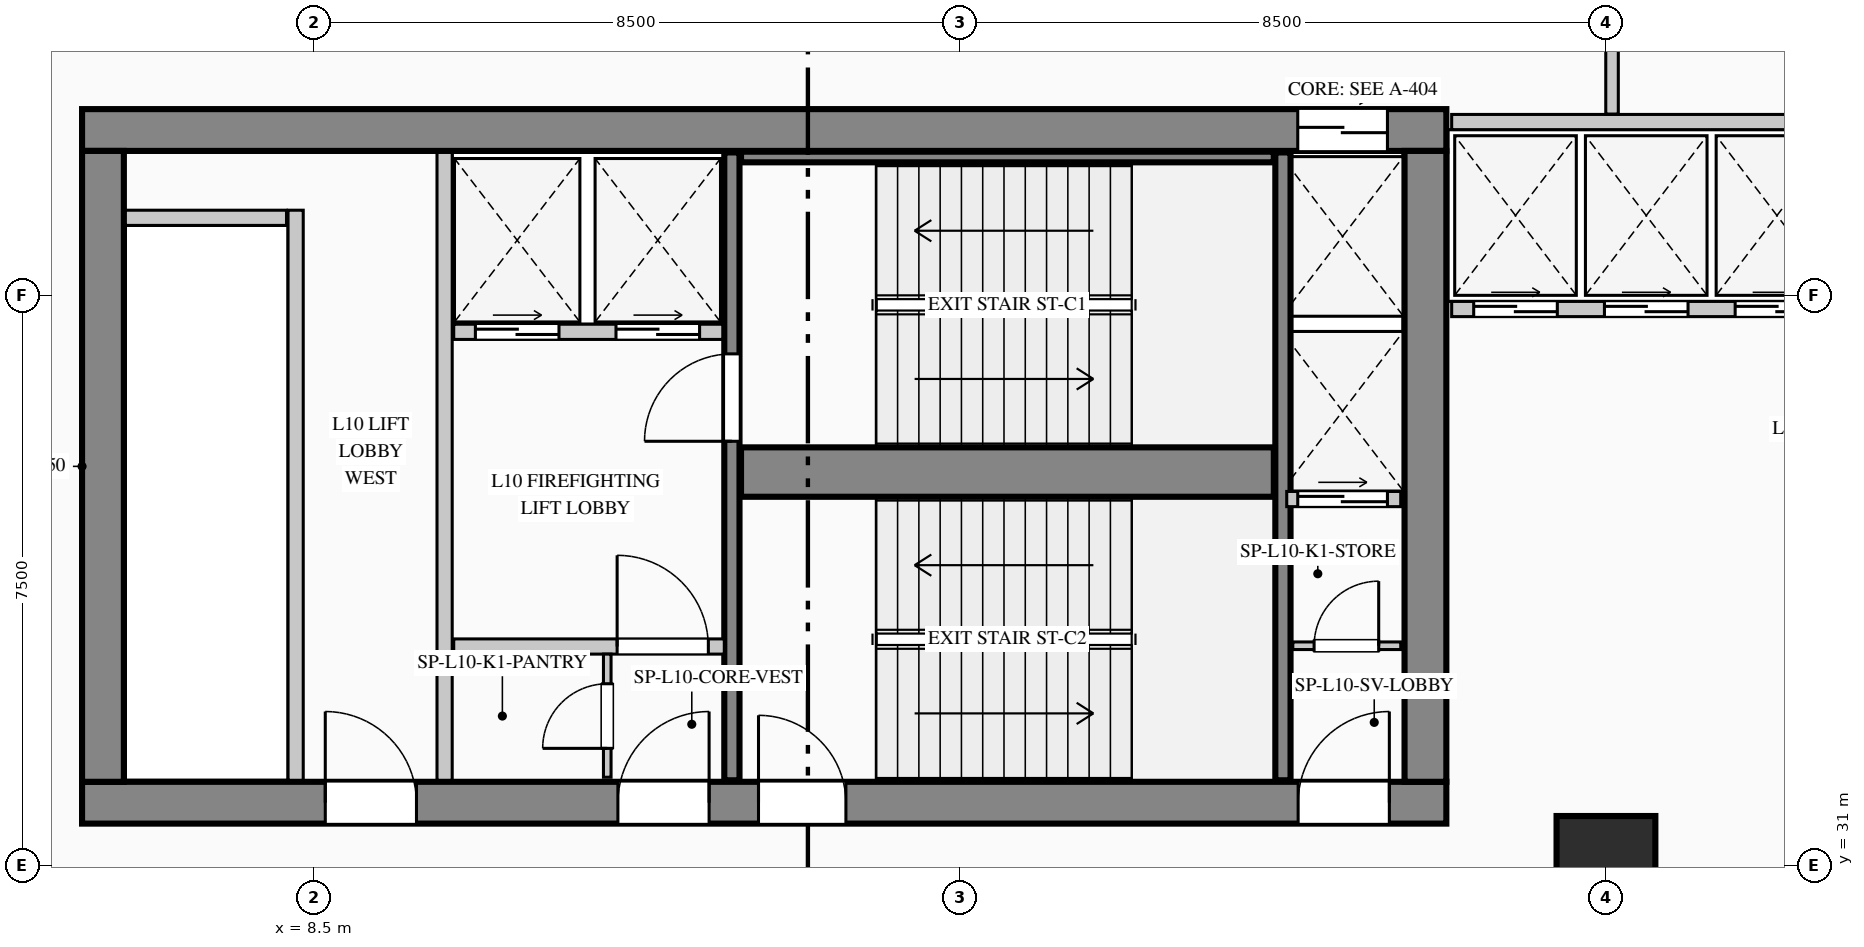
"""IFC4 building model, lengths in metres.
Left out: names, types, materials, properties, quantities, classifications, styles, units other than length and angle.
Written with IfcOpenShell. Run it as: python <this file> out.ifc"""

import sys

from ifc_helpers import new_model, si_unit, direction, frame, frame_2d, origin, origin_2d, place, context, subcontext, project, spatial, rectangle, extrude, element, fill, save


model = new_model("IFC4")
c1 = context("Model", 3, precision=1e-05, world=origin(), true_north=direction((0.0, 1.0)))
c2 = subcontext(c1, "Body", "Model", "MODEL_VIEW")
j1 = project(units=[si_unit("LENGTHUNIT", "METRE"), si_unit("PLANEANGLEUNIT", "RADIAN")], contexts=[c1])
p1 = place(None, origin())
s1 = spatial("IfcSite", under=j1, at=p1, CompositionType="ELEMENT")
p2 = place(p1, origin())
s2 = spatial("IfcBuilding", under=s1, at=p2, CompositionType="ELEMENT")
p3 = place(p2, frame((0.0, 0.0, 44.6)))
s3 = spatial("IfcBuildingStorey", under=s2, at=p3, CompositionType="ELEMENT", Elevation=44.6)
p4 = place(p3, frame((5.45, 40.675, 0.0), z_axis=(0.0, 0.0, 1.0), x_axis=(1.0, 0.0, 0.0)))
e1 = element("IfcWall", 1, at=p4, inside=s3, PredefinedType="SHEAR", context=c2, shape_type="SweptSolid", body=[
    extrude(rectangle(XDim=17.95, YDim=0.55, at=frame_2d((8.975, 0.0))), origin(), (0.0, 0.0, 1.0), 4.4),
])
p5 = place(p4, frame((15.995, 0.0, 0.0)))
e2 = element("IfcOpeningElement", 2, at=p5, cuts=e1, PredefinedType="OPENING", context=c2, shape_type="SweptSolid", body=[
    extrude(rectangle(XDim=1.18, YDim=2.25, at=frame_2d((0.59, 1.125))), frame((0.0, 0.285, 0.0), z_axis=(0.0, -1.0, 0.0), x_axis=(1.0, 0.0, 0.0)), (0.0, 0.0, 1.0), 0.57),
])
p6 = place(p3, frame((5.45, 31.825, 0.0), z_axis=(0.0, 0.0, 1.0), x_axis=(1.0, 0.0, 0.0)))
e3 = element("IfcWall", 3, at=p6, inside=s3, PredefinedType="SHEAR", context=c2, shape_type="SweptSolid", body=[
    extrude(rectangle(XDim=17.95, YDim=0.55, at=frame_2d((8.975, 0.0))), origin(), (0.0, 0.0, 1.0), 4.4),
])
p7 = place(p6, frame((3.2, 0.0, 0.0)))
e4 = element("IfcOpeningElement", 4, at=p7, cuts=e3, PredefinedType="OPENING", context=c2, shape_type="SweptSolid", body=[
    extrude(rectangle(XDim=1.2, YDim=2.2, at=frame_2d((0.6, 1.1))), frame((0.0, 0.285, 0.0), z_axis=(0.0, -1.0, 0.0), x_axis=(1.0, 0.0, 0.0)), (0.0, 0.0, 1.0), 0.57),
])
p8 = place(p6, frame((7.05, 0.0, 0.0)))
e5 = element("IfcOpeningElement", 5, at=p8, cuts=e3, PredefinedType="OPENING", context=c2, shape_type="SweptSolid", body=[
    extrude(rectangle(XDim=1.2, YDim=2.2, at=frame_2d((0.6, 1.1))), frame((0.0, 0.285, 0.0), z_axis=(0.0, -1.0, 0.0), x_axis=(1.0, 0.0, 0.0)), (0.0, 0.0, 1.0), 0.57),
])
p9 = place(p6, frame((8.9, 0.0, 0.0)))
e6 = element("IfcOpeningElement", 6, at=p9, cuts=e3, PredefinedType="OPENING", context=c2, shape_type="SweptSolid", body=[
    extrude(rectangle(XDim=1.15, YDim=2.2, at=frame_2d((0.575, 1.1))), frame((0.0, 0.285, 0.0), z_axis=(0.0, -1.0, 0.0), x_axis=(1.0, 0.0, 0.0)), (0.0, 0.0, 1.0), 0.57),
])
p10 = place(p6, frame((16.0, 0.0, 0.0)))
e7 = element("IfcOpeningElement", 7, at=p10, cuts=e3, PredefinedType="OPENING", context=c2, shape_type="SweptSolid", body=[
    extrude(rectangle(XDim=1.2, YDim=2.2, at=frame_2d((0.6, 1.1))), frame((0.0, 0.285, 0.0), z_axis=(0.0, -1.0, 0.0), x_axis=(1.0, 0.0, 0.0)), (0.0, 0.0, 1.0), 0.57),
])
for number, where, z_axis, x_axis in (
    (8, (5.725, 32.1, 0.0), (0.0, 0.0, 1.0), (0.0, 1.0, 0.0)),
    (9, (23.125, 32.1, 0.0), (0.0, 0.0, 1.0), (0.0, 1.0, 0.0)),
):
    element("IfcWall", number, at=place(p3, frame(where, z_axis=z_axis, x_axis=x_axis)), inside=s3, PredefinedType="SHEAR", context=c2, shape_type="SweptSolid", body=[
        extrude(rectangle(XDim=8.3, YDim=0.55, at=frame_2d((4.15, 0.0))), origin(), (0.0, 0.0, 1.0), 4.4),
    ])
p11 = place(p3, frame((14.0, 32.12, 0.0), z_axis=(0.0, 0.0, 1.0), x_axis=(0.0, 1.0, 0.0)))
e10 = element("IfcWall", 10, at=p11, inside=s3, PredefinedType="SHEAR", context=c2, shape_type="SweptSolid", body=[
    extrude(rectangle(XDim=8.26, YDim=0.2, at=frame_2d((4.13, 0.0))), origin(), (0.0, 0.0, 1.0), 4.4),
])
p12 = place(p11, frame((4.46, 0.0, 0.0)))
e11 = element("IfcOpeningElement", 11, at=p12, cuts=e10, PredefinedType="OPENING", context=c2, shape_type="SweptSolid", body=[
    extrude(rectangle(XDim=1.15, YDim=2.2, at=frame_2d((0.575, 1.1))), frame((0.0, 0.11, 0.0), z_axis=(0.0, -1.0, 0.0), x_axis=(1.0, 0.0, 0.0)), (0.0, 0.0, 1.0), 0.22),
])
p13 = place(p3, frame((14.12, 36.175, 0.0), z_axis=(0.0, 0.0, 1.0), x_axis=(1.0, 0.0, 0.0)))
e12 = element("IfcWall", 12, at=p13, inside=s3, PredefinedType="SHEAR", context=c2, shape_type="SweptSolid", body=[
    extrude(rectangle(XDim=7.01, YDim=0.65, at=frame_2d((3.505, 0.0))), origin(), (0.0, 0.0, 1.0), 4.4),
])
p14 = place(p3, frame((21.25, 32.12, 0.0), z_axis=(0.0, 0.0, 1.0), x_axis=(0.0, 1.0, 0.0)))
e13 = element("IfcWall", 13, at=p14, inside=s3, PredefinedType="SHEAR", context=c2, shape_type="SweptSolid", body=[
    extrude(rectangle(XDim=8.26, YDim=0.2, at=frame_2d((4.13, 0.0))), origin(), (0.0, 0.0, 1.0), 4.4),
])
p15 = place(p3, frame((14.12, 40.32, 0.0), z_axis=(0.0, 0.0, 1.0), x_axis=(1.0, 0.0, 0.0)))
e14 = element("IfcWall", 14, at=p15, inside=s3, PredefinedType="SHEAR", context=c2, shape_type="SweptSolid", body=[
    extrude(rectangle(XDim=7.01, YDim=0.14, at=frame_2d((3.505, 0.0))), origin(), (0.0, 0.0, 1.0), 4.4),
])
p16 = place(p3, frame((25.5, 31.0, 0.0), z_axis=(0.0, 0.0, 1.0), x_axis=(1.0, 0.0, 0.0)))
e15 = element("IfcColumn", 15, at=p16, inside=s3, PredefinedType="COLUMN", context=c2, shape_type="SweptSolid", body=[
    extrude(rectangle(XDim=1.3, YDim=1.3, at=origin_2d()), origin(), (0.0, 0.0, 1.0), 4.4),
])
p17 = place(p3, frame((8.523, 4.84, 0.0), z_axis=(0.0, 0.0, 1.0), x_axis=(-0.150394554312, 0.988626055712, 0.0)))
e16 = element("IfcWall", 16, at=p17, inside=s3, PredefinedType="STANDARD", context=c2, shape_type="SweptSolid", body=[
    extrude(rectangle(XDim=36.738, YDim=0.28, at=frame_2d((18.369, 0.0))), origin(), (0.0, 0.0, 1.0), 4.1),
])
p18 = place(p17, frame((22.762, 0.0, 0.9)))
e17 = element("IfcOpeningElement", 17, at=p18, cuts=e16, PredefinedType="OPENING", context=c2, shape_type="SweptSolid", body=[
    extrude(rectangle(XDim=1.5, YDim=1.8, at=frame_2d((0.75, 0.9))), frame((0.0, 0.15, 0.0), z_axis=(0.0, -1.0, 0.0), x_axis=(1.0, 0.0, 0.0)), (0.0, 0.0, 1.0), 0.3),
])
p19 = place(p3, frame((8.26, 32.12, 0.0), z_axis=(0.0, 0.0, 1.0), x_axis=(0.0, 1.0, 0.0)))
e18 = element("IfcWall", 18, at=p19, inside=s3, PredefinedType="PARTITIONING", context=c2, shape_type="SweptSolid", body=[
    extrude(rectangle(XDim=7.5, YDim=0.2, at=frame_2d((3.75, 0.0))), origin(), (0.0, 0.0, 1.0), 4.1),
])
p20 = place(p3, frame((6.02, 39.52, 0.0), z_axis=(0.0, 0.0, 1.0), x_axis=(1.0, 0.0, 0.0)))
e19 = element("IfcWall", 19, at=p20, inside=s3, PredefinedType="PARTITIONING", context=c2, shape_type="SweptSolid", body=[
    extrude(rectangle(XDim=2.12, YDim=0.2, at=frame_2d((1.06, 0.0))), origin(), (0.0, 0.0, 1.0), 4.1),
])
p21 = place(p3, frame((10.22, 32.12, 0.0), z_axis=(0.0, 0.0, 1.0), x_axis=(0.0, 1.0, 0.0)))
e20 = element("IfcWall", 20, at=p21, inside=s3, PredefinedType="PARTITIONING", context=c2, shape_type="SweptSolid", body=[
    extrude(rectangle(XDim=8.26, YDim=0.2, at=frame_2d((4.13, 0.0))), origin(), (0.0, 0.0, 1.0), 4.1),
])
p22 = place(p3, frame((10.34, 38.02, 0.0), z_axis=(0.0, 0.0, 1.0), x_axis=(1.0, 0.0, 0.0)))
e21 = element("IfcWall", 21, at=p22, inside=s3, PredefinedType="PARTITIONING", context=c2, shape_type="SweptSolid", body=[
    extrude(rectangle(XDim=3.54, YDim=0.2, at=frame_2d((1.77, 0.0))), origin(), (0.0, 0.0, 1.0), 4.1),
])
p23 = place(p22, frame((0.285, 0.0, 0.0)))
e22 = element("IfcOpeningElement", 22, at=p23, cuts=e21, PredefinedType="OPENING", context=c2, shape_type="SweptSolid", body=[
    extrude(rectangle(XDim=1.1, YDim=2.2, at=frame_2d((0.55, 1.1))), frame((0.0, 0.11, 0.0), z_axis=(0.0, -1.0, 0.0), x_axis=(1.0, 0.0, 0.0)), (0.0, 0.0, 1.0), 0.22),
])
p24 = place(p22, frame((2.135, 0.0, 0.0)))
e23 = element("IfcOpeningElement", 23, at=p24, cuts=e21, PredefinedType="OPENING", context=c2, shape_type="SweptSolid", body=[
    extrude(rectangle(XDim=1.1, YDim=2.2, at=frame_2d((0.55, 1.1))), frame((0.0, 0.11, 0.0), z_axis=(0.0, -1.0, 0.0), x_axis=(1.0, 0.0, 0.0)), (0.0, 0.0, 1.0), 0.22),
])
p25 = place(p3, frame((10.34, 33.88, 0.0), z_axis=(0.0, 0.0, 1.0), x_axis=(1.0, 0.0, 0.0)))
e24 = element("IfcWall", 24, at=p25, inside=s3, PredefinedType="PARTITIONING", context=c2, shape_type="SweptSolid", body=[
    extrude(rectangle(XDim=3.56, YDim=0.2, at=frame_2d((1.78, 0.0))), origin(), (0.0, 0.0, 1.0), 4.1),
])
p26 = place(p25, frame((2.15, 0.0, 0.0)))
e25 = element("IfcOpeningElement", 25, at=p26, cuts=e24, PredefinedType="OPENING", context=c2, shape_type="SweptSolid", body=[
    extrude(rectangle(XDim=1.2, YDim=2.2, at=frame_2d((0.6, 1.1))), frame((0.0, 0.11, 0.0), z_axis=(0.0, -1.0, 0.0), x_axis=(1.0, 0.0, 0.0)), (0.0, 0.0, 1.0), 0.22),
])
p27 = place(p3, frame((12.36, 32.16, 0.0), z_axis=(0.0, 0.0, 1.0), x_axis=(0.0, 1.0, 0.0)))
e26 = element("IfcWall", 26, at=p27, inside=s3, PredefinedType="PARTITIONING", context=c2, shape_type="SweptSolid", body=[
    extrude(rectangle(XDim=1.62, YDim=0.1, at=frame_2d((0.81, 0.0))), origin(), (0.0, 0.0, 1.0), 4.1),
])
p28 = place(p27, frame((0.38, 0.0, 0.0)))
e27 = element("IfcOpeningElement", 27, at=p28, cuts=e26, PredefinedType="OPENING", context=c2, shape_type="SweptSolid", body=[
    extrude(rectangle(XDim=0.85, YDim=2.1, at=frame_2d((0.425, 1.05))), frame((0.0, 0.06, 0.0), z_axis=(0.0, -1.0, 0.0), x_axis=(1.0, 0.0, 0.0)), (0.0, 0.0, 1.0), 0.12),
])
p29 = place(p3, frame((21.38, 33.89, 0.0), z_axis=(0.0, 0.0, 1.0), x_axis=(1.0, 0.0, 0.0)))
e28 = element("IfcWall", 28, at=p29, inside=s3, PredefinedType="PARTITIONING", context=c2, shape_type="SweptSolid", body=[
    extrude(rectangle(XDim=1.42, YDim=0.1, at=frame_2d((0.71, 0.0))), origin(), (0.0, 0.0, 1.0), 4.1),
])
p30 = place(p29, frame((0.28, 0.0, 0.0)))
e29 = element("IfcOpeningElement", 29, at=p30, cuts=e28, PredefinedType="OPENING", context=c2, shape_type="SweptSolid", body=[
    extrude(rectangle(XDim=0.85, YDim=2.1, at=frame_2d((0.425, 1.05))), frame((0.0, 0.06, 0.0), z_axis=(0.0, -1.0, 0.0), x_axis=(1.0, 0.0, 0.0)), (0.0, 0.0, 1.0), 0.12),
])
p31 = place(p3, frame((21.3, 35.82, 0.0), z_axis=(0.0, 0.0, 1.0), x_axis=(1.0, 0.0, 0.0)))
e30 = element("IfcWall", 30, at=p31, inside=s3, PredefinedType="PARTITIONING", context=c2, shape_type="SweptSolid", body=[
    extrude(rectangle(XDim=1.5, YDim=0.2, at=frame_2d((0.75, 0.0))), origin(), (0.0, 0.0, 1.0), 4.1),
])
p32 = place(p31, frame((0.145, 0.0, 0.0)))
e31 = element("IfcOpeningElement", 31, at=p32, cuts=e30, PredefinedType="OPENING", context=c2, shape_type="SweptSolid", body=[
    extrude(rectangle(XDim=1.18, YDim=2.25, at=frame_2d((0.59, 1.125))), frame((0.0, 0.11, 0.0), z_axis=(0.0, -1.0, 0.0), x_axis=(1.0, 0.0, 0.0)), (0.0, 0.0, 1.0), 0.22),
])
p33 = place(p3, frame((23.47, 40.78, 0.0), z_axis=(0.0, 0.0, 1.0), x_axis=(1.0, 0.0, 0.0)))
e32 = element("IfcWall", 32, at=p33, inside=s3, PredefinedType="PARTITIONING", context=c2, shape_type="SweptSolid", body=[
    extrude(rectangle(XDim=6.91, YDim=0.2, at=frame_2d((3.455, 0.0))), origin(), (0.0, 0.0, 1.0), 4.1),
])
p34 = place(p3, frame((23.47, 38.32, 0.0), z_axis=(0.0, 0.0, 1.0), x_axis=(1.0, 0.0, 0.0)))
e33 = element("IfcWall", 33, at=p34, inside=s3, PredefinedType="PARTITIONING", context=c2, shape_type="SweptSolid", body=[
    extrude(rectangle(XDim=6.79, YDim=0.2, at=frame_2d((3.395, 0.0))), origin(), (0.0, 0.0, 1.0), 4.1),
])
p35 = place(p34, frame((0.29, 0.0, 0.0)))
e34 = element("IfcOpeningElement", 34, at=p35, cuts=e33, PredefinedType="OPENING", context=c2, shape_type="SweptSolid", body=[
    extrude(rectangle(XDim=1.1, YDim=2.2, at=frame_2d((0.55, 1.1))), frame((0.0, 0.11, 0.0), z_axis=(0.0, -1.0, 0.0), x_axis=(1.0, 0.0, 0.0)), (0.0, 0.0, 1.0), 0.22),
])
p36 = place(p34, frame((2.01, 0.0, 0.0)))
e35 = element("IfcOpeningElement", 35, at=p36, cuts=e33, PredefinedType="OPENING", context=c2, shape_type="SweptSolid", body=[
    extrude(rectangle(XDim=1.1, YDim=2.2, at=frame_2d((0.55, 1.1))), frame((0.0, 0.11, 0.0), z_axis=(0.0, -1.0, 0.0), x_axis=(1.0, 0.0, 0.0)), (0.0, 0.0, 1.0), 0.22),
])
p37 = place(p34, frame((3.73, 0.0, 0.0)))
e36 = element("IfcOpeningElement", 36, at=p37, cuts=e33, PredefinedType="OPENING", context=c2, shape_type="SweptSolid", body=[
    extrude(rectangle(XDim=1.1, YDim=2.2, at=frame_2d((0.55, 1.1))), frame((0.0, 0.11, 0.0), z_axis=(0.0, -1.0, 0.0), x_axis=(1.0, 0.0, 0.0)), (0.0, 0.0, 1.0), 0.22),
])
p38 = place(p34, frame((5.45, 0.0, 0.0)))
e37 = element("IfcOpeningElement", 37, at=p38, cuts=e33, PredefinedType="OPENING", context=c2, shape_type="SweptSolid", body=[
    extrude(rectangle(XDim=1.1, YDim=2.2, at=frame_2d((0.55, 1.1))), frame((0.0, 0.11, 0.0), z_axis=(0.0, -1.0, 0.0), x_axis=(1.0, 0.0, 0.0)), (0.0, 0.0, 1.0), 0.22),
])
p39 = place(p3, frame((25.58, 40.885, 0.0), z_axis=(0.0, 0.0, 1.0), x_axis=(0.0, 1.0, 0.0)))
e38 = element("IfcWall", 38, at=p39, inside=s3, PredefinedType="PARTITIONING", context=c2, shape_type="SweptSolid", body=[
    extrude(rectangle(XDim=2.33, YDim=0.165, at=frame_2d((1.165, 0.0))), origin(), (0.0, 0.0, 1.0), 4.1),
])
p40 = place(p7, origin())
e39 = element("IfcDoor", 39, at=p40, inside=s3, OperationType="SINGLE_SWING_LEFT", PredefinedType="DOOR", context=c2, shape_type="SweptSolid", body=[
    extrude(rectangle(XDim=1.2, YDim=2.2, at=frame_2d((0.6, 1.1))), frame((0.0, 0.025, 0.0), z_axis=(0.0, -1.0, 0.0), x_axis=(1.0, 0.0, 0.0)), (0.0, 0.0, 1.0), 0.05),
])
fill(e4, e39)
p41 = place(p8, origin())
e40 = element("IfcDoor", 40, at=p41, inside=s3, OperationType="SINGLE_SWING_RIGHT", PredefinedType="DOOR", context=c2, shape_type="SweptSolid", body=[
    extrude(rectangle(XDim=1.2, YDim=2.2, at=frame_2d((0.6, 1.1))), frame((0.0, 0.025, 0.0), z_axis=(0.0, -1.0, 0.0), x_axis=(1.0, 0.0, 0.0)), (0.0, 0.0, 1.0), 0.05),
])
fill(e5, e40)
p42 = place(p9, origin())
e41 = element("IfcDoor", 41, at=p42, inside=s3, OperationType="SINGLE_SWING_LEFT", PredefinedType="DOOR", context=c2, shape_type="SweptSolid", body=[
    extrude(rectangle(XDim=1.15, YDim=2.2, at=frame_2d((0.575, 1.1))), frame((0.0, 0.025, 0.0), z_axis=(0.0, -1.0, 0.0), x_axis=(1.0, 0.0, 0.0)), (0.0, 0.0, 1.0), 0.05),
])
fill(e6, e41)
p43 = place(p10, origin())
e42 = element("IfcDoor", 42, at=p43, inside=s3, OperationType="SINGLE_SWING_RIGHT", PredefinedType="DOOR", context=c2, shape_type="SweptSolid", body=[
    extrude(rectangle(XDim=1.2, YDim=2.2, at=frame_2d((0.6, 1.1))), frame((0.0, 0.025, 0.0), z_axis=(0.0, -1.0, 0.0), x_axis=(1.0, 0.0, 0.0)), (0.0, 0.0, 1.0), 0.05),
])
fill(e7, e42)
p44 = place(p26, origin())
e43 = element("IfcDoor", 43, at=p44, inside=s3, OperationType="SINGLE_SWING_LEFT", PredefinedType="DOOR", context=c2, shape_type="SweptSolid", body=[
    extrude(rectangle(XDim=1.2, YDim=2.2, at=frame_2d((0.6, 1.1))), frame((0.0, 0.025, 0.0), z_axis=(0.0, -1.0, 0.0), x_axis=(1.0, 0.0, 0.0)), (0.0, 0.0, 1.0), 0.05),
])
fill(e25, e43)
p45 = place(p28, origin())
e44 = element("IfcDoor", 44, at=p45, inside=s3, OperationType="SINGLE_SWING_LEFT", PredefinedType="DOOR", context=c2, shape_type="SweptSolid", body=[
    extrude(rectangle(XDim=0.85, YDim=2.1, at=frame_2d((0.425, 1.05))), frame((0.0, 0.025, 0.0), z_axis=(0.0, -1.0, 0.0), x_axis=(1.0, 0.0, 0.0)), (0.0, 0.0, 1.0), 0.05),
])
fill(e27, e44)
p46 = place(p30, origin())
e45 = element("IfcDoor", 45, at=p46, inside=s3, OperationType="SINGLE_SWING_RIGHT", PredefinedType="DOOR", context=c2, shape_type="SweptSolid", body=[
    extrude(rectangle(XDim=0.85, YDim=2.1, at=frame_2d((0.425, 1.05))), frame((0.0, 0.025, 0.0), z_axis=(0.0, -1.0, 0.0), x_axis=(1.0, 0.0, 0.0)), (0.0, 0.0, 1.0), 0.05),
])
fill(e29, e45)
p47 = place(p12, origin())
e46 = element("IfcDoor", 46, at=p47, inside=s3, OperationType="SINGLE_SWING_LEFT", PredefinedType="DOOR", context=c2, shape_type="SweptSolid", body=[
    extrude(rectangle(XDim=1.15, YDim=2.2, at=frame_2d((0.575, 1.1))), frame((0.0, 0.025, 0.0), z_axis=(0.0, -1.0, 0.0), x_axis=(1.0, 0.0, 0.0)), (0.0, 0.0, 1.0), 0.05),
])
fill(e11, e46)
p48 = place(p23, origin())
e47 = element("IfcDoor", 47, at=p48, inside=s3, OperationType="DOUBLE_DOOR_SLIDING", PredefinedType="DOOR", context=c2, shape_type="SweptSolid", body=[
    extrude(rectangle(XDim=1.1, YDim=2.2, at=frame_2d((0.55, 1.1))), frame((0.0, 0.025, 0.0), z_axis=(0.0, -1.0, 0.0), x_axis=(1.0, 0.0, 0.0)), (0.0, 0.0, 1.0), 0.05),
])
fill(e22, e47)
p49 = place(p24, origin())
e48 = element("IfcDoor", 48, at=p49, inside=s3, OperationType="DOUBLE_DOOR_SLIDING", PredefinedType="DOOR", context=c2, shape_type="SweptSolid", body=[
    extrude(rectangle(XDim=1.1, YDim=2.2, at=frame_2d((0.55, 1.1))), frame((0.0, 0.025, 0.0), z_axis=(0.0, -1.0, 0.0), x_axis=(1.0, 0.0, 0.0)), (0.0, 0.0, 1.0), 0.05),
])
fill(e23, e48)
p50 = place(p5, origin())
e49 = element("IfcDoor", 49, at=p50, inside=s3, OperationType="DOUBLE_DOOR_SLIDING", PredefinedType="DOOR", context=c2, shape_type="SweptSolid", body=[
    extrude(rectangle(XDim=1.18, YDim=2.25, at=frame_2d((0.59, 1.125))), frame((0.0, 0.025, 0.0), z_axis=(0.0, -1.0, 0.0), x_axis=(1.0, 0.0, 0.0)), (0.0, 0.0, 1.0), 0.05),
])
fill(e2, e49)
p51 = place(p32, origin())
e50 = element("IfcDoor", 50, at=p51, inside=s3, OperationType="DOUBLE_DOOR_SLIDING", PredefinedType="DOOR", context=c2, shape_type="SweptSolid", body=[
    extrude(rectangle(XDim=1.18, YDim=2.25, at=frame_2d((0.59, 1.125))), frame((0.0, 0.025, 0.0), z_axis=(0.0, -1.0, 0.0), x_axis=(1.0, 0.0, 0.0)), (0.0, 0.0, 1.0), 0.05),
])
fill(e31, e50)
p52 = place(p35, origin())
e51 = element("IfcDoor", 51, at=p52, inside=s3, OperationType="DOUBLE_DOOR_SLIDING", PredefinedType="DOOR", context=c2, shape_type="SweptSolid", body=[
    extrude(rectangle(XDim=1.1, YDim=2.2, at=frame_2d((0.55, 1.1))), frame((0.0, 0.025, 0.0), z_axis=(0.0, -1.0, 0.0), x_axis=(1.0, 0.0, 0.0)), (0.0, 0.0, 1.0), 0.05),
])
fill(e34, e51)
p53 = place(p36, origin())
e52 = element("IfcDoor", 52, at=p53, inside=s3, OperationType="DOUBLE_DOOR_SLIDING", PredefinedType="DOOR", context=c2, shape_type="SweptSolid", body=[
    extrude(rectangle(XDim=1.1, YDim=2.2, at=frame_2d((0.55, 1.1))), frame((0.0, 0.025, 0.0), z_axis=(0.0, -1.0, 0.0), x_axis=(1.0, 0.0, 0.0)), (0.0, 0.0, 1.0), 0.05),
])
fill(e35, e52)
p54 = place(p37, origin())
e53 = element("IfcDoor", 53, at=p54, inside=s3, OperationType="DOUBLE_DOOR_SLIDING", PredefinedType="DOOR", context=c2, shape_type="SweptSolid", body=[
    extrude(rectangle(XDim=1.1, YDim=2.2, at=frame_2d((0.55, 1.1))), frame((0.0, 0.025, 0.0), z_axis=(0.0, -1.0, 0.0), x_axis=(1.0, 0.0, 0.0)), (0.0, 0.0, 1.0), 0.05),
])
fill(e36, e53)
save(model, sys.argv[1])
